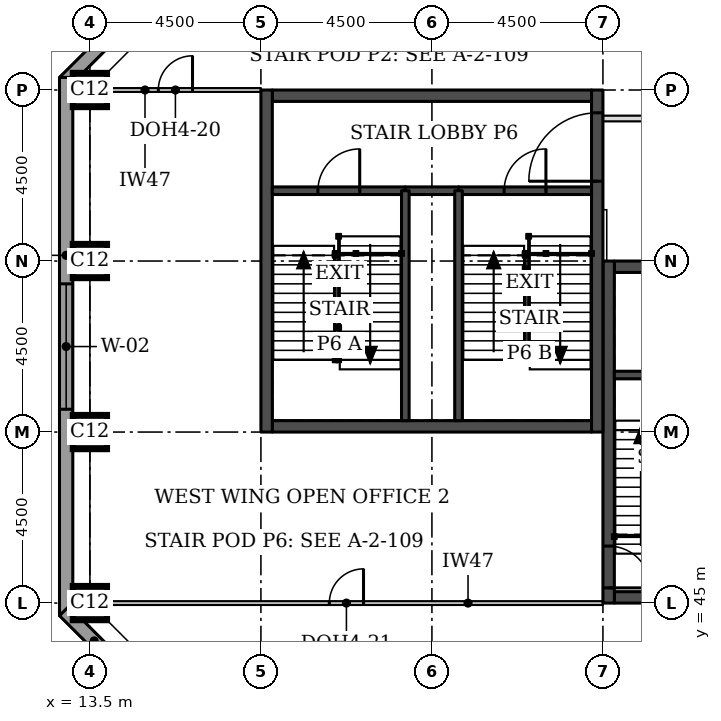
"""IFC4 building model, lengths in metres.
Left out: names, types, materials, properties, quantities, classifications, styles, units other than length and angle.
Written with IfcOpenShell. Run it as: python <this file> out.ifc"""

import sys

from ifc_helpers import new_model, si_unit, direction, frame, frame_2d, origin, origin_2d, place, context, subcontext, project, spatial, rectangle, extrude, element, fill, save


model = new_model("IFC4")
c1 = context("Model", 3, precision=1e-05, world=origin(), true_north=direction((0.0, 1.0)))
c2 = subcontext(c1, "Body", "Model", "MODEL_VIEW")
j1 = project(units=[si_unit("LENGTHUNIT", "METRE"), si_unit("PLANEANGLEUNIT", "RADIAN")], contexts=[c1])
p1 = place(None, origin())
s1 = spatial("IfcSite", under=j1, at=p1, CompositionType="ELEMENT")
p2 = place(p1, origin())
s2 = spatial("IfcBuilding", under=s1, at=p2, CompositionType="ELEMENT")
p3 = place(p2, frame((0.0, 0.0, 173.6)))
s3 = spatial("IfcBuildingStorey", under=s2, at=p3, CompositionType="ELEMENT", Elevation=173.6)
for number, where, z_axis, x_axis in (
    (1, (13.5, 45.0, 0.0), (0.0, 0.0, 1.0), (1.0, 0.0, 0.0)),
    (2, (13.5, 49.5, 0.0), (0.0, 0.0, 1.0), (1.0, 0.0, 0.0)),
    (3, (13.5, 54.0, 0.0), (0.0, 0.0, 1.0), (1.0, 0.0, 0.0)),
    (4, (13.5, 58.5, 0.0), (0.0, 0.0, 1.0), (1.0, 0.0, 0.0)),
):
    element("IfcColumn", number, at=place(p3, frame(where, z_axis=z_axis, x_axis=x_axis)), inside=s3, PredefinedType="COLUMN", context=c2, shape_type="SweptSolid", body=[
        extrude(rectangle(XDim=0.9, YDim=0.9, at=origin_2d()), origin(), (0.0, 0.0, 1.0), 3.7),
    ])
p4 = place(p3, frame((27.3, 45.15, 0.0), z_axis=(0.0, 0.0, 1.0), x_axis=(1.0, 0.0, 0.0)))
e5 = element("IfcWall", 5, at=p4, inside=s3, PredefinedType="SHEAR", context=c2, shape_type="SweptSolid", body=[
    extrude(rectangle(XDim=8.4, YDim=0.3, at=frame_2d((4.2, 0.0))), origin(), (0.0, 0.0, 1.0), 3.7),
])
p5 = place(p4, frame((5.2, 0.0, 0.0)))
e6 = element("IfcOpeningElement", 6, at=p5, cuts=e5, PredefinedType="OPENING", context=c2, shape_type="SweptSolid", body=[
    extrude(rectangle(XDim=1.0, YDim=2.1, at=frame_2d((0.5, 1.05))), frame((0.0, 0.16, 0.0), z_axis=(0.0, -1.0, 0.0), x_axis=(1.0, 0.0, 0.0)), (0.0, 0.0, 1.0), 0.32),
])
p6 = place(p3, frame((27.3, 53.85, 0.0), z_axis=(0.0, 0.0, 1.0), x_axis=(1.0, 0.0, 0.0)))
e7 = element("IfcWall", 7, at=p6, inside=s3, PredefinedType="SHEAR", context=c2, shape_type="SweptSolid", body=[
    extrude(rectangle(XDim=8.4, YDim=0.3, at=frame_2d((4.2, 0.0))), origin(), (0.0, 0.0, 1.0), 3.7),
])
p7 = place(p6, frame((6.4, 0.0, 0.0)))
e8 = element("IfcOpeningElement", 8, at=p7, cuts=e7, PredefinedType="OPENING", context=c2, shape_type="SweptSolid", body=[
    extrude(rectangle(XDim=1.1, YDim=2.1, at=frame_2d((0.55, 1.05))), frame((0.0, 0.16, 0.0), z_axis=(0.0, -1.0, 0.0), x_axis=(1.0, 0.0, 0.0)), (0.0, 0.0, 1.0), 0.32),
])
p8 = place(p3, frame((27.15, 45.0, 0.0), z_axis=(0.0, 0.0, 1.0), x_axis=(0.0, 1.0, 0.0)))
e9 = element("IfcWall", 9, at=p8, inside=s3, PredefinedType="SHEAR", context=c2, shape_type="SweptSolid", body=[
    extrude(rectangle(XDim=9.0, YDim=0.3, at=frame_2d((4.5, 0.0))), origin(), (0.0, 0.0, 1.0), 3.7),
])
p9 = place(p8, frame((0.4, 0.0, 0.0)))
e10 = element("IfcOpeningElement", 10, at=p9, cuts=e9, PredefinedType="OPENING", context=c2, shape_type="SweptSolid", body=[
    extrude(rectangle(XDim=1.1, YDim=2.1, at=frame_2d((0.55, 1.05))), frame((0.0, 0.16, 0.0), z_axis=(0.0, -1.0, 0.0), x_axis=(1.0, 0.0, 0.0)), (0.0, 0.0, 1.0), 0.32),
])
for number, where, z_axis, x_axis in (
    (11, (18.3, 49.65, 0.0), (0.0, 0.0, 1.0), (1.0, 0.0, 0.0)),
    (12, (18.3, 58.35, 0.0), (0.0, 0.0, 1.0), (1.0, 0.0, 0.0)),
):
    element("IfcWall", number, at=place(p3, frame(where, z_axis=z_axis, x_axis=x_axis)), inside=s3, PredefinedType="SHEAR", context=c2, shape_type="SweptSolid", body=[
        extrude(rectangle(XDim=8.4, YDim=0.3, at=frame_2d((4.2, 0.0))), origin(), (0.0, 0.0, 1.0), 3.7),
    ])
p10 = place(p3, frame((18.15, 49.5, 0.0), z_axis=(0.0, 0.0, 1.0), x_axis=(0.0, 1.0, 0.0)))
e13 = element("IfcWall", 13, at=p10, inside=s3, PredefinedType="SHEAR", context=c2, shape_type="SweptSolid", body=[
    extrude(rectangle(XDim=9.0, YDim=0.3, at=frame_2d((4.5, 0.0))), origin(), (0.0, 0.0, 1.0), 3.7),
])
p11 = place(p3, frame((26.85, 49.5, 0.0), z_axis=(0.0, 0.0, 1.0), x_axis=(0.0, 1.0, 0.0)))
e14 = element("IfcWall", 14, at=p11, inside=s3, PredefinedType="SHEAR", context=c2, shape_type="SweptSolid", body=[
    extrude(rectangle(XDim=9.0, YDim=0.3, at=frame_2d((4.5, 0.0))), origin(), (0.0, 0.0, 1.0), 3.7),
])
p12 = place(p11, frame((6.6, 0.0, 0.0)))
e15 = element("IfcOpeningElement", 15, at=p12, cuts=e14, PredefinedType="OPENING", context=c2, shape_type="SweptSolid", body=[
    extrude(rectangle(XDim=1.8, YDim=2.1, at=frame_2d((0.9, 1.05))), frame((0.0, 0.16, 0.0), z_axis=(0.0, -1.0, 0.0), x_axis=(1.0, 0.0, 0.0)), (0.0, 0.0, 1.0), 0.32),
])
p13 = place(p3, frame((17.792, 63.676, 0.0), z_axis=(0.0, 0.0, 1.0), x_axis=(-0.707106781187, -0.707106781187, 0.0)))
e16 = element("IfcWall", 16, at=p13, inside=s3, PredefinedType="STANDARD", context=c2, shape_type="SweptSolid", body=[
    extrude(rectangle(XDim=7.027, YDim=0.35, at=frame_2d((3.513, 0.0))), origin(), (0.0, 0.0, 1.0), 3.525),
])
p14 = place(p13, frame((1.863, 0.0, 0.9)))
e17 = element("IfcOpeningElement", 17, at=p14, cuts=e16, PredefinedType="OPENING", context=c2, shape_type="SweptSolid", body=[
    extrude(rectangle(XDim=3.3, YDim=1.9, at=frame_2d((1.65, 0.95))), frame((0.0, 0.185, 0.0), z_axis=(0.0, -1.0, 0.0), x_axis=(1.0, 0.0, 0.0)), (0.0, 0.0, 1.0), 0.37),
])
p15 = place(p3, frame((12.875, 58.831, 0.0), z_axis=(0.0, 0.0, 1.0), x_axis=(0.0, -1.0, 0.0)))
e18 = element("IfcWall", 18, at=p15, inside=s3, PredefinedType="STANDARD", context=c2, shape_type="SweptSolid", body=[
    extrude(rectangle(XDim=14.163, YDim=0.35, at=frame_2d((7.081, 0.0))), origin(), (0.0, 0.0, 1.0), 3.525),
])
p16 = place(p15, frame((5.431, 0.0, 0.9)))
e19 = element("IfcOpeningElement", 19, at=p16, cuts=e18, PredefinedType="OPENING", context=c2, shape_type="SweptSolid", body=[
    extrude(rectangle(XDim=3.3, YDim=1.9, at=frame_2d((1.65, 0.95))), frame((0.0, 0.185, 0.0), z_axis=(0.0, -1.0, 0.0), x_axis=(1.0, 0.0, 0.0)), (0.0, 0.0, 1.0), 0.37),
])
p17 = place(p3, frame((12.824, 44.792, 0.0), z_axis=(0.0, 0.0, 1.0), x_axis=(0.707106781187, -0.707106781187, 0.0)))
e20 = element("IfcWall", 20, at=p17, inside=s3, PredefinedType="STANDARD", context=c2, shape_type="SweptSolid", body=[
    extrude(rectangle(XDim=7.027, YDim=0.35, at=frame_2d((3.513, 0.0))), origin(), (0.0, 0.0, 1.0), 3.525),
])
p18 = place(p17, frame((1.863, 0.0, 0.9)))
e21 = element("IfcOpeningElement", 21, at=p18, cuts=e20, PredefinedType="OPENING", context=c2, shape_type="SweptSolid", body=[
    extrude(rectangle(XDim=3.3, YDim=1.9, at=frame_2d((1.65, 0.95))), frame((0.0, 0.185, 0.0), z_axis=(0.0, -1.0, 0.0), x_axis=(1.0, 0.0, 0.0)), (0.0, 0.0, 1.0), 0.37),
])
p19 = place(p3, frame((13.5, 58.5, 0.0), z_axis=(0.0, 0.0, 1.0), x_axis=(1.0, 0.0, 0.0)))
e22 = element("IfcWall", 22, at=p19, inside=s3, PredefinedType="PARTITIONING", context=c2, shape_type="SweptSolid", body=[
    extrude(rectangle(XDim=4.5, YDim=0.1, at=frame_2d((2.25, 0.0))), origin(), (0.0, 0.0, 1.0), 2.55),
])
p20 = place(p19, frame((1.8, 0.0, 0.0)))
e23 = element("IfcOpeningElement", 23, at=p20, cuts=e22, PredefinedType="OPENING", context=c2, shape_type="SweptSolid", body=[
    extrude(rectangle(XDim=0.9, YDim=2.1, at=frame_2d((0.45, 1.05))), frame((0.0, 0.06, 0.0), z_axis=(0.0, -1.0, 0.0), x_axis=(1.0, 0.0, 0.0)), (0.0, 0.0, 1.0), 0.12),
])
p21 = place(p3, frame((27.0, 45.0, 0.0), z_axis=(0.0, 0.0, 1.0), x_axis=(-1.0, 0.0, 0.0)))
e24 = element("IfcWall", 24, at=p21, inside=s3, PredefinedType="PARTITIONING", context=c2, shape_type="SweptSolid", body=[
    extrude(rectangle(XDim=13.5, YDim=0.1, at=frame_2d((6.75, 0.0))), origin(), (0.0, 0.0, 1.0), 2.55),
])
p22 = place(p21, frame((6.3, 0.0, 0.0)))
e25 = element("IfcOpeningElement", 25, at=p22, cuts=e24, PredefinedType="OPENING", context=c2, shape_type="SweptSolid", body=[
    extrude(rectangle(XDim=0.9, YDim=2.1, at=frame_2d((0.45, 1.05))), frame((0.0, 0.06, 0.0), z_axis=(0.0, -1.0, 0.0), x_axis=(1.0, 0.0, 0.0)), (0.0, 0.0, 1.0), 0.12),
])
p23 = place(p3, frame((27.0, 57.75, 0.0), z_axis=(0.0, 0.0, 1.0), x_axis=(1.0, 0.0, 0.0)))
e26 = element("IfcWall", 26, at=p23, inside=s3, PredefinedType="PARTITIONING", context=c2, shape_type="SweptSolid", body=[
    extrude(rectangle(XDim=2.4, YDim=0.15, at=frame_2d((1.2, 0.0))), origin(), (0.0, 0.0, 1.0), 3.55),
])
p24 = place(p3, frame((27.3, 51.0, 0.0), z_axis=(0.0, 0.0, 1.0), x_axis=(1.0, 0.0, 0.0)))
e27 = element("IfcWall", 27, at=p24, inside=s3, PredefinedType="SOLIDWALL", context=c2, shape_type="SweptSolid", body=[
    extrude(rectangle(XDim=3.0, YDim=0.2, at=frame_2d((1.5, 0.0))), origin(), (0.0, 0.0, 1.0), 3.55),
])
p25 = place(p3, frame((21.8, 55.85, 0.0), z_axis=(0.0, 0.0, 1.0), x_axis=(1.0, 0.0, 0.0)))
e28 = element("IfcWall", 28, at=p25, inside=s3, PredefinedType="SOLIDWALL", context=c2, shape_type="SweptSolid", body=[
    extrude(rectangle(XDim=1.4, YDim=0.2, at=frame_2d((0.7, 0.0))), origin(), (0.0, 0.0, 1.0), 3.55),
])
p26 = place(p3, frame((18.3, 55.85, 0.0), z_axis=(0.0, 0.0, 1.0), x_axis=(1.0, 0.0, 0.0)))
e29 = element("IfcWall", 29, at=p26, inside=s3, PredefinedType="SOLIDWALL", context=c2, shape_type="SweptSolid", body=[
    extrude(rectangle(XDim=3.5, YDim=0.2, at=frame_2d((1.75, 0.0))), origin(), (0.0, 0.0, 1.0), 3.55),
])
p27 = place(p26, frame((1.2, 0.0, 0.0)))
e30 = element("IfcOpeningElement", 30, at=p27, cuts=e29, PredefinedType="OPENING", context=c2, shape_type="SweptSolid", body=[
    extrude(rectangle(XDim=1.1, YDim=2.1, at=frame_2d((0.55, 1.05))), frame((0.0, 0.11, 0.0), z_axis=(0.0, -1.0, 0.0), x_axis=(1.0, 0.0, 0.0)), (0.0, 0.0, 1.0), 0.22),
])
p28 = place(p3, frame((23.2, 55.85, 0.0), z_axis=(0.0, 0.0, 1.0), x_axis=(1.0, 0.0, 0.0)))
e31 = element("IfcWall", 31, at=p28, inside=s3, PredefinedType="SOLIDWALL", context=c2, shape_type="SweptSolid", body=[
    extrude(rectangle(XDim=3.5, YDim=0.2, at=frame_2d((1.75, 0.0))), origin(), (0.0, 0.0, 1.0), 3.55),
])
p29 = place(p28, frame((1.2, 0.0, 0.0)))
e32 = element("IfcOpeningElement", 32, at=p29, cuts=e31, PredefinedType="OPENING", context=c2, shape_type="SweptSolid", body=[
    extrude(rectangle(XDim=1.1, YDim=2.1, at=frame_2d((0.55, 1.05))), frame((0.0, 0.11, 0.0), z_axis=(0.0, -1.0, 0.0), x_axis=(1.0, 0.0, 0.0)), (0.0, 0.0, 1.0), 0.22),
])
for number, where, z_axis, x_axis in (
    (33, (21.8, 49.8, 0.0), (0.0, 0.0, 1.0), (0.0, 1.0, 0.0)),
    (34, (23.2, 49.8, 0.0), (0.0, 0.0, 1.0), (0.0, 1.0, 0.0)),
):
    element("IfcWall", number, at=place(p3, frame(where, z_axis=z_axis, x_axis=x_axis)), inside=s3, PredefinedType="SOLIDWALL", context=c2, shape_type="SweptSolid", body=[
        extrude(rectangle(XDim=6.05, YDim=0.2, at=frame_2d((3.025, 0.0))), origin(), (0.0, 0.0, 1.0), 3.55),
    ])
p30 = place(p16, origin())
e35 = element("IfcWindow", 35, at=p30, inside=s3, PartitioningType="SINGLE_PANEL", PredefinedType="WINDOW", context=c2, shape_type="SweptSolid", body=[
    extrude(rectangle(XDim=3.3, YDim=1.9, at=frame_2d((1.65, 0.95))), frame((0.0, 0.085, 0.0), z_axis=(0.0, -1.0, 0.0), x_axis=(1.0, 0.0, 0.0)), (0.0, 0.0, 1.0), 0.06),
])
fill(e19, e35)
p31 = place(p20, origin())
e36 = element("IfcDoor", 36, at=p31, inside=s3, OperationType="SINGLE_SWING_RIGHT", PredefinedType="DOOR", context=c2, shape_type="SweptSolid", body=[
    extrude(rectangle(XDim=0.9, YDim=2.1, at=frame_2d((0.45, 1.05))), frame((0.0, 0.025, 0.0), z_axis=(0.0, -1.0, 0.0), x_axis=(1.0, 0.0, 0.0)), (0.0, 0.0, 1.0), 0.05),
])
fill(e23, e36)
p32 = place(p22, frame((0.9, 0.0, 0.0), z_axis=(0.0, 0.0, 1.0), x_axis=(-1.0, 0.0, 0.0)))
e37 = element("IfcDoor", 37, at=p32, inside=s3, OperationType="SINGLE_SWING_RIGHT", PredefinedType="DOOR", context=c2, shape_type="SweptSolid", body=[
    extrude(rectangle(XDim=0.9, YDim=2.1, at=frame_2d((0.45, 1.05))), frame((0.0, 0.025, 0.0), z_axis=(0.0, -1.0, 0.0), x_axis=(1.0, 0.0, 0.0)), (0.0, 0.0, 1.0), 0.05),
])
fill(e25, e37)
p33 = place(p9, frame((1.1, 0.0, 0.0), z_axis=(0.0, 0.0, 1.0), x_axis=(-1.0, 0.0, 0.0)))
e38 = element("IfcDoor", 38, at=p33, inside=s3, OperationType="SINGLE_SWING_RIGHT", PredefinedType="DOOR", context=c2, shape_type="SweptSolid", body=[
    extrude(rectangle(XDim=1.1, YDim=2.1, at=frame_2d((0.55, 1.05))), frame((0.0, 0.025, 0.0), z_axis=(0.0, -1.0, 0.0), x_axis=(1.0, 0.0, 0.0)), (0.0, 0.0, 1.0), 0.05),
])
fill(e10, e38)
p34 = place(p27, origin())
e39 = element("IfcDoor", 39, at=p34, inside=s3, OperationType="SINGLE_SWING_RIGHT", PredefinedType="DOOR", context=c2, shape_type="SweptSolid", body=[
    extrude(rectangle(XDim=1.1, YDim=2.1, at=frame_2d((0.55, 1.05))), frame((0.0, 0.025, 0.0), z_axis=(0.0, -1.0, 0.0), x_axis=(1.0, 0.0, 0.0)), (0.0, 0.0, 1.0), 0.05),
])
fill(e30, e39)
p35 = place(p29, origin())
e40 = element("IfcDoor", 40, at=p35, inside=s3, OperationType="SINGLE_SWING_RIGHT", PredefinedType="DOOR", context=c2, shape_type="SweptSolid", body=[
    extrude(rectangle(XDim=1.1, YDim=2.1, at=frame_2d((0.55, 1.05))), frame((0.0, 0.025, 0.0), z_axis=(0.0, -1.0, 0.0), x_axis=(1.0, 0.0, 0.0)), (0.0, 0.0, 1.0), 0.05),
])
fill(e32, e40)
p36 = place(p12, origin())
e41 = element("IfcDoor", 41, at=p36, inside=s3, OperationType="SINGLE_SWING_LEFT", PredefinedType="DOOR", context=c2, shape_type="SweptSolid", body=[
    extrude(rectangle(XDim=1.8, YDim=2.1, at=frame_2d((0.9, 1.05))), frame((0.0, 0.025, 0.0), z_axis=(0.0, -1.0, 0.0), x_axis=(1.0, 0.0, 0.0)), (0.0, 0.0, 1.0), 0.05),
])
fill(e15, e41)
save(model, sys.argv[1])
